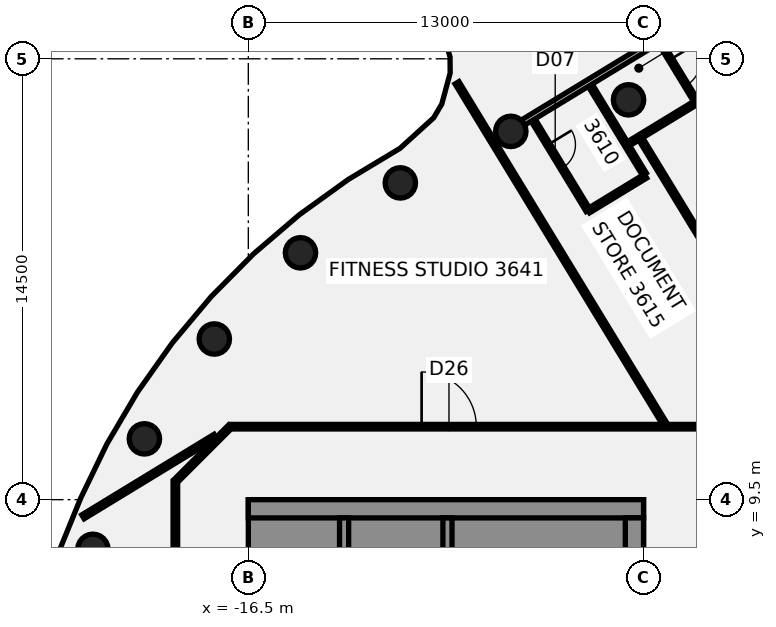
"""IFC4 building model, lengths in metres.
Left out: names, types, materials, properties, quantities, classifications, styles, units other than length and angle.
Written with IfcOpenShell. Run it as: python <this file> out.ifc"""

import sys

from ifc_helpers import new_model, si_unit, direction, frame, frame_2d, origin, origin_2d, place, context, subcontext, project, spatial, polyline, rectangle, circle, outline, extrude, element, fill, save


model = new_model("IFC4")
c1 = context("Model", 3, precision=1e-05, world=origin(), true_north=direction((0.0, 1.0)))
c2 = subcontext(c1, "Body", "Model", "MODEL_VIEW")
j1 = project(units=[si_unit("LENGTHUNIT", "METRE"), si_unit("PLANEANGLEUNIT", "RADIAN")], contexts=[c1])
p1 = place(None, origin())
s1 = spatial("IfcSite", under=j1, at=p1, CompositionType="ELEMENT")
p2 = place(p1, origin())
s2 = spatial("IfcBuilding", under=s1, at=p2, CompositionType="ELEMENT")
p3 = place(p2, frame((0.0, 0.0, 148.0)))
s3 = spatial("IfcBuildingStorey", under=s2, at=p3, CompositionType="ELEMENT", Elevation=148.0)
for number, where, z_axis, x_axis in (
    (1, (-3.994, 22.651, -0.14), (0.0, 0.0, 1.0), (1.0, 0.0, 0.0)),
    (2, (-7.866, 21.613, -0.14), (0.0, 0.0, 1.0), (1.0, 0.0, 0.0)),
    (3, (-11.5, 19.919, -0.14), (0.0, 0.0, 1.0), (1.0, 0.0, 0.0)),
    (4, (-14.784, 17.619, -0.14), (0.0, 0.0, 1.0), (1.0, 0.0, 0.0)),
    (5, (-17.619, 14.784, -0.14), (0.0, 0.0, 1.0), (1.0, 0.0, 0.0)),
    (6, (-19.919, 11.5, -0.14), (0.0, 0.0, 1.0), (1.0, 0.0, 0.0)),
    (7, (-21.613, 7.866, -0.14), (0.0, 0.0, 1.0), (1.0, 0.0, 0.0)),
):
    element("IfcColumn", number, at=place(p3, frame(where, z_axis=z_axis, x_axis=x_axis)), inside=s3, PredefinedType="COLUMN", context=c2, shape_type="SweptSolid", body=[
        extrude(circle(Radius=0.5, at=origin_2d()), origin(), (0.0, 0.0, 1.0), 3.75),
    ])
p4 = place(p3, frame((-9.982, 36.083, 0.0), z_axis=(0.0, 0.0, 1.0), x_axis=(0.520141723066, -0.854079965768, 0.0)))
e8 = element("IfcWall", 8, at=p4, inside=s3, PredefinedType="PARTITIONING", context=c2, shape_type="SweptSolid", body=[
    extrude(rectangle(XDim=15.746, YDim=0.15, at=frame_2d((7.873, 0.0))), origin(), (0.0, 0.0, 1.0), 3.01),
])
p5 = place(p4, frame((14.17, 0.0, 0.0)))
e9 = element("IfcOpeningElement", 9, at=p5, cuts=e8, PredefinedType="OPENING", context=c2, shape_type="SweptSolid", body=[
    extrude(rectangle(XDim=1.0, YDim=2.1, at=frame_2d((0.5, 1.05))), frame((0.0, 0.085, 0.0), z_axis=(0.0, -1.0, 0.0), x_axis=(1.0, 0.0, 0.0)), (0.0, 0.0, 1.0), 0.17),
])
p6 = place(p4, frame((4.42, 0.0, 0.0)))
e10 = element("IfcOpeningElement", 10, at=p6, cuts=e8, PredefinedType="OPENING", context=c2, shape_type="SweptSolid", body=[
    extrude(rectangle(XDim=0.9, YDim=2.1, at=frame_2d((0.45, 1.05))), frame((0.0, 0.085, 0.0), z_axis=(0.0, -1.0, 0.0), x_axis=(1.0, 0.0, 0.0)), (0.0, 0.0, 1.0), 0.17),
])
p7 = place(p3, frame((-9.636, 23.211, 0.0), z_axis=(0.0, 0.0, 1.0), x_axis=(0.520188794996, -0.854051296797, 0.0)))
e11 = element("IfcWall", 11, at=p7, inside=s3, PredefinedType="PARTITIONING", context=c2, shape_type="SweptSolid", body=[
    extrude(rectangle(XDim=13.129, YDim=0.15, at=frame_2d((6.564, 0.0))), origin(), (0.0, 0.0, 1.0), 3.01),
])
p8 = place(p3, frame((-7.134, 21.987, 0.0), z_axis=(0.0, 0.0, 1.0), x_axis=(0.520129484143, -0.854087419253, 0.0)))
e12 = element("IfcWall", 12, at=p8, inside=s3, PredefinedType="PARTITIONING", context=c2, shape_type="SweptSolid", body=[
    extrude(rectangle(XDim=3.479, YDim=0.15, at=frame_2d((1.74, 0.0))), origin(), (0.0, 0.0, 1.0), 3.01),
])
p9 = place(p8, frame((0.95, 0.0, 0.0)))
e13 = element("IfcOpeningElement", 13, at=p9, cuts=e12, PredefinedType="OPENING", context=c2, shape_type="SweptSolid", body=[
    extrude(rectangle(XDim=0.9, YDim=2.1, at=frame_2d((0.45, 1.05))), frame((0.0, 0.085, 0.0), z_axis=(0.0, -1.0, 0.0), x_axis=(1.0, 0.0, 0.0)), (0.0, 0.0, 1.0), 0.17),
])
p10 = place(p3, frame((-5.252, 23.127, 0.0), z_axis=(0.0, 0.0, 1.0), x_axis=(0.519996770542, -0.854168226186, 0.0)))
e14 = element("IfcWall", 14, at=p10, inside=s3, PredefinedType="PARTITIONING", context=c2, shape_type="SweptSolid", body=[
    extrude(rectangle(XDim=3.42, YDim=0.15, at=frame_2d((1.71, 0.0))), origin(), (0.0, 0.0, 1.0), 3.01),
])
p11 = place(p3, frame((-3.59, 21.359, 0.0), z_axis=(0.0, 0.0, 1.0), x_axis=(0.520200619289, -0.8540440947, 0.0)))
e15 = element("IfcWall", 15, at=p11, inside=s3, PredefinedType="PARTITIONING", context=c2, shape_type="SweptSolid", body=[
    extrude(rectangle(XDim=10.96, YDim=0.15, at=frame_2d((5.48, 0.0))), origin(), (0.0, 0.0, 1.0), 3.01),
])
p12 = place(p11, frame((6.52, 0.0, 0.0)))
e16 = element("IfcOpeningElement", 16, at=p12, cuts=e15, PredefinedType="OPENING", context=c2, shape_type="SweptSolid", body=[
    extrude(rectangle(XDim=0.9, YDim=2.1, at=frame_2d((0.45, 1.05))), frame((0.0, 0.085, 0.0), z_axis=(0.0, -1.0, 0.0), x_axis=(1.0, 0.0, 0.0)), (0.0, 0.0, 1.0), 0.17),
])
p13 = place(p3, frame((-17.065, 11.9, 0.0), z_axis=(0.0, 0.0, 1.0), x_axis=(1.0, 0.0, 0.0)))
e17 = element("IfcWall", 17, at=p13, inside=s3, PredefinedType="PARTITIONING", context=c2, shape_type="SweptSolid", body=[
    extrude(rectangle(XDim=34.165, YDim=0.15, at=frame_2d((17.083, 0.0))), origin(), (0.0, 0.0, 1.0), 3.01),
])
p14 = place(p13, frame((22.386, 0.0, 0.0)))
e18 = element("IfcOpeningElement", 18, at=p14, cuts=e17, PredefinedType="OPENING", context=c2, shape_type="SweptSolid", body=[
    extrude(rectangle(XDim=1.8, YDim=2.1, at=frame_2d((0.9, 1.05))), frame((0.0, 0.085, 0.0), z_axis=(0.0, -1.0, 0.0), x_axis=(1.0, 0.0, 0.0)), (0.0, 0.0, 1.0), 0.17),
])
p15 = place(p13, frame((29.196, 0.0, 0.0)))
e19 = element("IfcOpeningElement", 19, at=p15, cuts=e17, PredefinedType="OPENING", context=c2, shape_type="SweptSolid", body=[
    extrude(rectangle(XDim=1.8, YDim=2.1, at=frame_2d((0.9, 1.05))), frame((0.0, 0.085, 0.0), z_axis=(0.0, -1.0, 0.0), x_axis=(1.0, 0.0, 0.0)), (0.0, 0.0, 1.0), 0.17),
])
p16 = place(p13, frame((6.265, 0.0, 0.0)))
e20 = element("IfcOpeningElement", 20, at=p16, cuts=e17, PredefinedType="OPENING", context=c2, shape_type="SweptSolid", body=[
    extrude(rectangle(XDim=1.8, YDim=2.1, at=frame_2d((0.9, 1.05))), frame((0.0, 0.085, 0.0), z_axis=(0.0, -1.0, 0.0), x_axis=(1.0, 0.0, 0.0)), (0.0, 0.0, 1.0), 0.17),
])
p17 = place(p3, frame((-21.939, 8.935, 0.0), z_axis=(0.0, 0.0, 1.0), x_axis=(0.854032920273, 0.520218964562, 0.0)))
e21 = element("IfcWall", 21, at=p17, inside=s3, PredefinedType="PARTITIONING", context=c2, shape_type="SweptSolid", body=[
    extrude(rectangle(XDim=5.096, YDim=0.15, at=frame_2d((2.548, 0.0))), origin(), (0.0, 0.0, 1.0), 3.01),
])
p18 = place(p3, frame((-7.675, 21.774, 0.0), z_axis=(0.0, 0.0, 1.0), x_axis=(0.85429303398, 0.519791700678, 0.0)))
e22 = element("IfcWall", 22, at=p18, inside=s3, PredefinedType="PARTITIONING", context=c2, shape_type="SweptSolid", body=[
    extrude(rectangle(XDim=13.371, YDim=0.2, at=frame_2d((6.686, 0.0))), origin(), (0.0, 0.0, 1.0), 3.01),
])
p19 = place(p18, frame((5.771, 0.0, 0.0)))
e23 = element("IfcOpeningElement", 23, at=p19, cuts=e22, PredefinedType="OPENING", context=c2, shape_type="SweptSolid", body=[
    extrude(rectangle(XDim=1.4, YDim=2.1, at=frame_2d((0.7, 1.05))), frame((0.0, 0.11, 0.0), z_axis=(0.0, -1.0, 0.0), x_axis=(1.0, 0.0, 0.0)), (0.0, 0.0, 1.0), 0.22),
])
p20 = place(p3, frame((-5.314, 18.998, 0.0), z_axis=(0.0, 0.0, 1.0), x_axis=(0.854125681103, 0.520066650422, 0.0)))
e24 = element("IfcWall", 24, at=p20, inside=s3, PredefinedType="PARTITIONING", context=c2, shape_type="SweptSolid", body=[
    extrude(rectangle(XDim=2.2, YDim=0.15, at=frame_2d((1.1, 0.0))), origin(), (0.0, 0.0, 1.0), 3.01),
])
p21 = place(p3, frame((-3.991, 21.208, 0.0), z_axis=(0.0, 0.0, 1.0), x_axis=(0.854103164221, 0.520103628971, 0.0)))
e25 = element("IfcWall", 25, at=p21, inside=s3, PredefinedType="PARTITIONING", context=c2, shape_type="SweptSolid", body=[
    extrude(rectangle(XDim=2.62, YDim=0.15, at=frame_2d((1.31, 0.0))), origin(), (0.0, 0.0, 1.0), 3.01),
])
p22 = place(p3, frame((-18.872, 10.128, 0.0), z_axis=(0.0, 0.0, 1.0), x_axis=(0.707106781187, 0.707106781187, 0.0)))
e26 = element("IfcWall", 26, at=p22, inside=s3, PredefinedType="PARTITIONING", context=c2, shape_type="SweptSolid", body=[
    extrude(rectangle(XDim=2.505, YDim=0.15, at=frame_2d((1.253, 0.0))), origin(), (0.0, 0.0, 1.0), 3.01),
])
p23 = place(p3, frame((-18.9, -10.1, 0.0), z_axis=(0.0, 0.0, 1.0), x_axis=(0.0, 1.0, 0.0)))
e27 = element("IfcWall", 27, at=p23, inside=s3, PredefinedType="PARTITIONING", context=c2, shape_type="SweptSolid", body=[
    extrude(rectangle(XDim=20.2, YDim=0.15, at=frame_2d((10.1, 0.0))), origin(), (0.0, 0.0, 1.0), 3.01),
])
p24 = place(p23, frame((12.057, 0.0, 0.0)))
e28 = element("IfcOpeningElement", 28, at=p24, cuts=e27, PredefinedType="OPENING", context=c2, shape_type="SweptSolid", body=[
    extrude(rectangle(XDim=1.8, YDim=2.1, at=frame_2d((0.9, 1.05))), frame((0.0, 0.085, 0.0), z_axis=(0.0, -1.0, 0.0), x_axis=(1.0, 0.0, 0.0)), (0.0, 0.0, 1.0), 0.17),
])
p25 = place(p23, frame((4.439, 0.0, 0.0)))
e29 = element("IfcOpeningElement", 29, at=p25, cuts=e27, PredefinedType="OPENING", context=c2, shape_type="SweptSolid", body=[
    extrude(rectangle(XDim=0.9, YDim=2.1, at=frame_2d((0.45, 1.05))), frame((0.0, 0.085, 0.0), z_axis=(0.0, -1.0, 0.0), x_axis=(1.0, 0.0, 0.0)), (0.0, 0.0, 1.0), 0.17),
])
p26 = place(p3, origin())
e30 = element("IfcWall", 30, at=p26, inside=s3, PredefinedType="SHEAR", context=c2, shape_type="SweptSolid", body=[
    extrude(outline(polyline([(-13.5, -8.125), (-15.9, -8.125), (-15.9, -5.625), (-13.5, -5.625), (-13.5, -5.375), (-15.9, -5.375), (-15.9, 5.375), (-13.5, 5.375), (-13.5, 5.625), (-15.9, 5.625), (-15.9, 8.125), (-13.5, 8.125), (-13.5, 8.9), (-15.9, 8.9), (-16.5, 8.9), (-16.5, -8.9), (-15.9, -8.9), (-13.5, -8.9), (-13.5, -8.125)])), origin(), (0.0, 0.0, 1.0), 3.61),
])
p27 = place(p3, frame((-16.5, 9.2, 0.0), z_axis=(0.0, 0.0, 1.0), x_axis=(1.0, 0.0, 0.0)))
e31 = element("IfcWall", 31, at=p27, inside=s3, PredefinedType="SHEAR", context=c2, shape_type="SweptSolid", body=[
    extrude(rectangle(XDim=13.0, YDim=0.6, at=frame_2d((6.5, 0.0))), origin(), (0.0, 0.0, 1.0), 3.61),
])
p28 = place(p3, origin())
e32 = element("IfcWall", 32, at=p28, inside=s3, PredefinedType="SHEAR", context=c2, shape_type="SweptSolid", body=[
    extrude(outline(polyline([(-9.8, -5.375), (-9.8, -5.625), (-7.5, -5.625), (-7.2, -5.625), (-7.2, 8.9), (-7.5, 8.9), (-9.8, 8.9), (-9.8, 8.125), (-7.5, 8.125), (-7.5, 5.625), (-9.8, 5.625), (-9.8, 5.375), (-7.5, 5.375), (-7.5, 2.875), (-9.8, 2.875), (-9.8, 2.625), (-7.5, 2.625), (-7.5, 0.125), (-9.8, 0.125), (-9.8, -0.125), (-7.5, -0.125), (-7.5, -2.625), (-9.8, -2.625), (-9.8, -2.875), (-7.5, -2.875), (-7.5, -5.375), (-9.8, -5.375)])), origin(), (0.0, 0.0, 1.0), 3.61),
])
p29 = place(p3, frame((-13.35, -8.9, 0.0), z_axis=(0.0, 0.0, 1.0), x_axis=(0.0, 1.0, 0.0)))
e33 = element("IfcWall", 33, at=p29, inside=s3, PredefinedType="SHEAR", context=c2, shape_type="SweptSolid", body=[
    extrude(rectangle(XDim=17.8, YDim=0.3, at=frame_2d((8.9, 0.0))), origin(), (0.0, 0.0, 1.0), 3.61),
])
p30 = place(p29, frame((1.325, 0.0, 0.0)))
e34 = element("IfcOpeningElement", 34, at=p30, cuts=e33, PredefinedType="OPENING", context=c2, shape_type="SweptSolid", body=[
    extrude(rectangle(XDim=1.4, YDim=2.1, at=frame_2d((0.7, 1.05))), frame((0.0, 0.16, 0.0), z_axis=(0.0, -1.0, 0.0), x_axis=(1.0, 0.0, 0.0)), (0.0, 0.0, 1.0), 0.32),
])
p31 = place(p29, frame((6.546, 0.0, 0.0)))
e35 = element("IfcOpeningElement", 35, at=p31, cuts=e33, PredefinedType="OPENING", context=c2, shape_type="SweptSolid", body=[
    extrude(rectangle(XDim=1.0, YDim=2.1, at=frame_2d((0.5, 1.05))), frame((0.0, 0.16, 0.0), z_axis=(0.0, -1.0, 0.0), x_axis=(1.0, 0.0, 0.0)), (0.0, 0.0, 1.0), 0.32),
])
p32 = place(p29, frame((12.046, 0.0, 0.0)))
e36 = element("IfcOpeningElement", 36, at=p32, cuts=e33, PredefinedType="OPENING", context=c2, shape_type="SweptSolid", body=[
    extrude(rectangle(XDim=1.0, YDim=2.1, at=frame_2d((0.5, 1.05))), frame((0.0, 0.16, 0.0), z_axis=(0.0, -1.0, 0.0), x_axis=(1.0, 0.0, 0.0)), (0.0, 0.0, 1.0), 0.32),
])
p33 = place(p3, frame((-9.95, -8.9, 0.0), z_axis=(0.0, 0.0, 1.0), x_axis=(0.0, 1.0, 0.0)))
e37 = element("IfcWall", 37, at=p33, inside=s3, PredefinedType="SHEAR", context=c2, shape_type="SweptSolid", body=[
    extrude(rectangle(XDim=17.8, YDim=0.3, at=frame_2d((8.9, 0.0))), origin(), (0.0, 0.0, 1.0), 3.61),
])
p34 = place(p33, frame((4.175, 0.0, 0.0)))
e38 = element("IfcOpeningElement", 38, at=p34, cuts=e37, PredefinedType="OPENING", context=c2, shape_type="SweptSolid", body=[
    extrude(rectangle(XDim=1.2, YDim=2.1, at=frame_2d((0.6, 1.05))), frame((0.0, 0.16, 0.0), z_axis=(0.0, -1.0, 0.0), x_axis=(1.0, 0.0, 0.0)), (0.0, 0.0, 1.0), 0.32),
])
p35 = place(p33, frame((6.925, 0.0, 0.0)))
e39 = element("IfcOpeningElement", 39, at=p35, cuts=e37, PredefinedType="OPENING", context=c2, shape_type="SweptSolid", body=[
    extrude(rectangle(XDim=1.2, YDim=2.1, at=frame_2d((0.6, 1.05))), frame((0.0, 0.16, 0.0), z_axis=(0.0, -1.0, 0.0), x_axis=(1.0, 0.0, 0.0)), (0.0, 0.0, 1.0), 0.32),
])
p36 = place(p3, frame((-3.8, -8.9, 0.0), z_axis=(0.0, 0.0, 1.0), x_axis=(0.0, 1.0, 0.0)))
e40 = element("IfcWall", 40, at=p36, inside=s3, PredefinedType="SHEAR", context=c2, shape_type="SweptSolid", body=[
    extrude(rectangle(XDim=17.8, YDim=0.6, at=frame_2d((8.9, 0.0))), origin(), (0.0, 0.0, 1.0), 3.61),
])
p37 = place(p36, frame((1.25, 0.0, 0.0)))
e41 = element("IfcOpeningElement", 41, at=p37, cuts=e40, PredefinedType="OPENING", context=c2, shape_type="SweptSolid", body=[
    extrude(rectangle(XDim=1.8, YDim=2.1, at=frame_2d((0.9, 1.05))), frame((0.0, 0.31, 0.0), z_axis=(0.0, -1.0, 0.0), x_axis=(1.0, 0.0, 0.0)), (0.0, 0.0, 1.0), 0.62),
])
p38 = place(p36, frame((11.698, 0.0, 0.0)))
e42 = element("IfcOpeningElement", 42, at=p38, cuts=e40, PredefinedType="OPENING", context=c2, shape_type="SweptSolid", body=[
    extrude(rectangle(XDim=1.0, YDim=2.1, at=frame_2d((0.5, 1.05))), frame((0.0, 0.31, 0.0), z_axis=(0.0, -1.0, 0.0), x_axis=(1.0, 0.0, 0.0)), (0.0, 0.0, 1.0), 0.62),
])
p39 = place(p36, frame((15.222, 0.0, 0.0)))
e43 = element("IfcOpeningElement", 43, at=p39, cuts=e40, PredefinedType="OPENING", context=c2, shape_type="SweptSolid", body=[
    extrude(rectangle(XDim=1.0, YDim=2.1, at=frame_2d((0.5, 1.05))), frame((0.0, 0.31, 0.0), z_axis=(0.0, -1.0, 0.0), x_axis=(1.0, 0.0, 0.0)), (0.0, 0.0, 1.0), 0.62),
])
p40 = place(p5, frame((1.0, 0.0, 0.0), z_axis=(0.0, 0.0, 1.0), x_axis=(-1.0, 0.0, 0.0)))
e44 = element("IfcDoor", 44, at=p40, inside=s3, OperationType="SINGLE_SWING_RIGHT", PredefinedType="DOOR", context=c2, shape_type="SweptSolid", body=[
    extrude(rectangle(XDim=1.0, YDim=2.1, at=frame_2d((0.5, 1.05))), frame((0.0, 0.025, 0.0), z_axis=(0.0, -1.0, 0.0), x_axis=(1.0, 0.0, 0.0)), (0.0, 0.0, 1.0), 0.05),
])
fill(e9, e44)
p41 = place(p9, origin())
e45 = element("IfcDoor", 45, at=p41, inside=s3, OperationType="SINGLE_SWING_RIGHT", PredefinedType="DOOR", context=c2, shape_type="SweptSolid", body=[
    extrude(rectangle(XDim=0.9, YDim=2.1, at=frame_2d((0.45, 1.05))), frame((0.0, 0.025, 0.0), z_axis=(0.0, -1.0, 0.0), x_axis=(1.0, 0.0, 0.0)), (0.0, 0.0, 1.0), 0.05),
])
fill(e13, e45)
p42 = place(p16, origin())
e46 = element("IfcDoor", 46, at=p42, inside=s3, OperationType="DOUBLE_DOOR_SINGLE_SWING", PredefinedType="DOOR", context=c2, shape_type="SweptSolid", body=[
    extrude(rectangle(XDim=1.8, YDim=2.1, at=frame_2d((0.9, 1.05))), frame((0.0, 0.025, 0.0), z_axis=(0.0, -1.0, 0.0), x_axis=(1.0, 0.0, 0.0)), (0.0, 0.0, 1.0), 0.05),
])
fill(e20, e46)
save(model, sys.argv[1])
